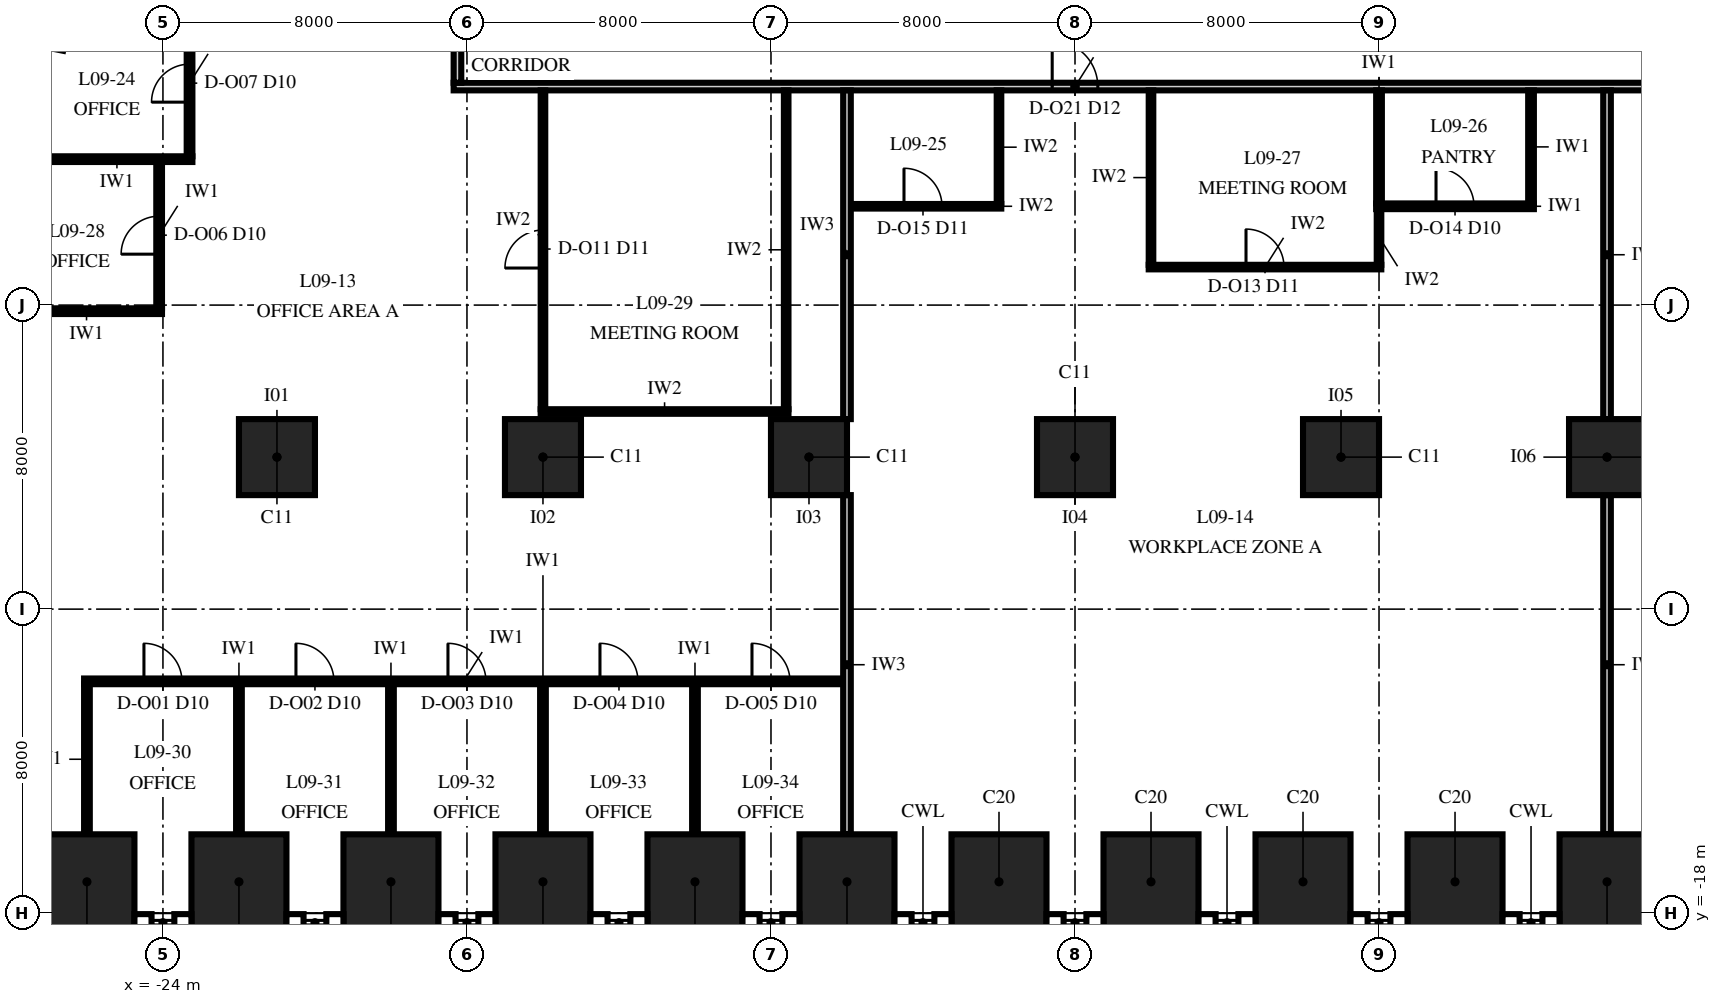
"""IFC4 building model, lengths in metres.
Left out: names, types, materials, properties, quantities, classifications, styles, units other than length and angle.
Written with IfcOpenShell. Run it as: python <this file> out.ifc"""

import sys

from ifc_helpers import new_model, si_unit, direction, frame, frame_2d, origin, origin_2d, place, context, subcontext, project, spatial, rectangle, extrude, element, fill, save


model = new_model("IFC4")
c1 = context("Model", 3, precision=1e-05, world=origin(), true_north=direction((0.0, 1.0)))
c2 = subcontext(c1, "Body", "Model", "MODEL_VIEW")
j1 = project(units=[si_unit("LENGTHUNIT", "METRE"), si_unit("PLANEANGLEUNIT", "RADIAN")], contexts=[c1])
p1 = place(None, origin())
s1 = spatial("IfcSite", under=j1, at=p1, CompositionType="ELEMENT")
p2 = place(p1, origin())
s2 = spatial("IfcBuilding", under=s1, at=p2, CompositionType="ELEMENT")
p3 = place(p2, frame((0.0, 0.0, 48.0)))
s3 = spatial("IfcBuildingStorey", under=s2, at=p3, CompositionType="ELEMENT", Elevation=48.0)
for number, where, z_axis, x_axis in (
    (1, (-26.0, -17.175, 0.0), (0.0, 0.0, 1.0), (1.0, 0.0, 0.0)),
    (2, (-22.0, -17.175, 0.0), (0.0, 0.0, 1.0), (1.0, 0.0, 0.0)),
    (3, (-18.0, -17.175, 0.0), (0.0, 0.0, 1.0), (1.0, 0.0, 0.0)),
    (4, (-14.0, -17.175, 0.0), (0.0, 0.0, 1.0), (1.0, 0.0, 0.0)),
    (5, (-10.0, -17.175, 0.0), (0.0, 0.0, 1.0), (1.0, 0.0, 0.0)),
    (6, (-6.0, -17.175, 0.0), (0.0, 0.0, 1.0), (1.0, 0.0, 0.0)),
    (7, (-2.0, -17.175, 0.0), (0.0, 0.0, 1.0), (1.0, 0.0, 0.0)),
    (8, (2.0, -17.175, 0.0), (0.0, 0.0, 1.0), (1.0, 0.0, 0.0)),
    (9, (6.0, -17.175, 0.0), (0.0, 0.0, 1.0), (1.0, 0.0, 0.0)),
    (10, (10.0, -17.175, 0.0), (0.0, 0.0, 1.0), (1.0, 0.0, 0.0)),
    (11, (14.0, -17.175, 0.0), (0.0, 0.0, 1.0), (1.0, 0.0, 0.0)),
):
    element("IfcColumn", number, at=place(p3, frame(where, z_axis=z_axis, x_axis=x_axis)), inside=s3, PredefinedType="COLUMN", context=c2, shape_type="SweptSolid", body=[
        extrude(rectangle(XDim=2.5, YDim=2.5, at=origin_2d()), origin(), (0.0, 0.0, 1.0), 4.0),
    ])
for number, where, z_axis, x_axis in (
    (12, (-21.0, -6.0, 0.0), (0.0, 0.0, 1.0), (1.0, 0.0, 0.0)),
    (13, (-14.0, -6.0, 0.0), (0.0, 0.0, 1.0), (1.0, 0.0, 0.0)),
    (14, (-7.0, -6.0, 0.0), (0.0, 0.0, 1.0), (1.0, 0.0, 0.0)),
    (15, (0.0, -6.0, 0.0), (0.0, 0.0, 1.0), (1.0, 0.0, 0.0)),
    (16, (7.0, -6.0, 0.0), (0.0, 0.0, 1.0), (1.0, 0.0, 0.0)),
    (17, (14.0, -6.0, 0.0), (0.0, 0.0, 1.0), (1.0, 0.0, 0.0)),
):
    element("IfcColumn", number, at=place(p3, frame(where, z_axis=z_axis, x_axis=x_axis)), inside=s3, PredefinedType="COLUMN", context=c2, shape_type="SweptSolid", body=[
        extrude(rectangle(XDim=2.0, YDim=2.0, at=origin_2d()), origin(), (0.0, 0.0, 1.0), 4.0),
    ])
p4 = place(p3, frame((-26.075, -11.9, 0.0), z_axis=(0.0, 0.0, 1.0), x_axis=(1.0, 0.0, 0.0)))
e18 = element("IfcWall", 18, at=p4, inside=s3, PredefinedType="PARTITIONING", context=c2, shape_type="SweptSolid", body=[
    extrude(rectangle(XDim=19.975, YDim=0.15, at=frame_2d((9.987, 0.0))), origin(), (0.0, 0.0, 1.0), 3.25),
])
p5 = place(p4, frame((1.575, 0.0, 0.0)))
e19 = element("IfcOpeningElement", 19, at=p5, cuts=e18, PredefinedType="OPENING", context=c2, shape_type="SweptSolid", body=[
    extrude(rectangle(XDim=1.0, YDim=2.3, at=frame_2d((0.5, 1.15))), frame((0.0, 0.09, 0.0), z_axis=(0.0, -1.0, 0.0), x_axis=(1.0, 0.0, 0.0)), (0.0, 0.0, 1.0), 0.18),
])
p6 = place(p4, frame((5.575, 0.0, 0.0)))
e20 = element("IfcOpeningElement", 20, at=p6, cuts=e18, PredefinedType="OPENING", context=c2, shape_type="SweptSolid", body=[
    extrude(rectangle(XDim=1.0, YDim=2.3, at=frame_2d((0.5, 1.15))), frame((0.0, 0.09, 0.0), z_axis=(0.0, -1.0, 0.0), x_axis=(1.0, 0.0, 0.0)), (0.0, 0.0, 1.0), 0.18),
])
p7 = place(p4, frame((9.575, 0.0, 0.0)))
e21 = element("IfcOpeningElement", 21, at=p7, cuts=e18, PredefinedType="OPENING", context=c2, shape_type="SweptSolid", body=[
    extrude(rectangle(XDim=1.0, YDim=2.3, at=frame_2d((0.5, 1.15))), frame((0.0, 0.09, 0.0), z_axis=(0.0, -1.0, 0.0), x_axis=(1.0, 0.0, 0.0)), (0.0, 0.0, 1.0), 0.18),
])
p8 = place(p4, frame((13.575, 0.0, 0.0)))
e22 = element("IfcOpeningElement", 22, at=p8, cuts=e18, PredefinedType="OPENING", context=c2, shape_type="SweptSolid", body=[
    extrude(rectangle(XDim=1.0, YDim=2.3, at=frame_2d((0.5, 1.15))), frame((0.0, 0.09, 0.0), z_axis=(0.0, -1.0, 0.0), x_axis=(1.0, 0.0, 0.0)), (0.0, 0.0, 1.0), 0.18),
])
p9 = place(p4, frame((17.575, 0.0, 0.0)))
e23 = element("IfcOpeningElement", 23, at=p9, cuts=e18, PredefinedType="OPENING", context=c2, shape_type="SweptSolid", body=[
    extrude(rectangle(XDim=1.0, YDim=2.3, at=frame_2d((0.5, 1.15))), frame((0.0, 0.09, 0.0), z_axis=(0.0, -1.0, 0.0), x_axis=(1.0, 0.0, 0.0)), (0.0, 0.0, 1.0), 0.18),
])
p10 = place(p3, frame((-14.06, -4.8, 0.0), z_axis=(0.0, 0.0, 1.0), x_axis=(1.0, 0.0, 0.0)))
e24 = element("IfcWall", 24, at=p10, inside=s3, PredefinedType="PARTITIONING", context=c2, shape_type="SweptSolid", body=[
    extrude(rectangle(XDim=6.52, YDim=0.12, at=frame_2d((3.26, 0.0))), origin(), (0.0, 0.0, 1.0), 3.25),
])
p11 = place(p3, frame((-27.996, -2.16, 0.0), z_axis=(0.0, 0.0, 1.0), x_axis=(1.0, 0.0, 0.0)))
e25 = element("IfcWall", 25, at=p11, inside=s3, PredefinedType="PARTITIONING", context=c2, shape_type="SweptSolid", body=[
    extrude(rectangle(XDim=3.971, YDim=0.15, at=frame_2d((1.986, 0.0))), origin(), (0.0, 0.0, 1.0), 3.25),
])
p12 = place(p3, frame((1.94, -1.0, 0.0), z_axis=(0.0, 0.0, 1.0), x_axis=(1.0, 0.0, 0.0)))
e26 = element("IfcWall", 26, at=p12, inside=s3, PredefinedType="PARTITIONING", context=c2, shape_type="SweptSolid", body=[
    extrude(rectangle(XDim=6.12, YDim=0.12, at=frame_2d((3.06, 0.0))), origin(), (0.0, 0.0, 1.0), 3.25),
])
p13 = place(p12, frame((2.56, 0.0, 0.0)))
e27 = element("IfcOpeningElement", 27, at=p13, cuts=e26, PredefinedType="OPENING", context=c2, shape_type="SweptSolid", body=[
    extrude(rectangle(XDim=1.0, YDim=2.4, at=frame_2d((0.5, 1.2))), frame((0.0, 0.075, 0.0), z_axis=(0.0, -1.0, 0.0), x_axis=(1.0, 0.0, 0.0)), (0.0, 0.0, 1.0), 0.15),
])
p14 = place(p3, frame((-5.9, 0.6, 0.0), z_axis=(0.0, 0.0, 1.0), x_axis=(1.0, 0.0, 0.0)))
e28 = element("IfcWall", 28, at=p14, inside=s3, PredefinedType="PARTITIONING", context=c2, shape_type="SweptSolid", body=[
    extrude(rectangle(XDim=3.96, YDim=0.12, at=frame_2d((1.98, 0.0))), origin(), (0.0, 0.0, 1.0), 3.25),
])
p15 = place(p14, frame((1.4, 0.0, 0.0)))
e29 = element("IfcOpeningElement", 29, at=p15, cuts=e28, PredefinedType="OPENING", context=c2, shape_type="SweptSolid", body=[
    extrude(rectangle(XDim=1.0, YDim=2.4, at=frame_2d((0.5, 1.2))), frame((0.0, 0.075, 0.0), z_axis=(0.0, -1.0, 0.0), x_axis=(1.0, 0.0, 0.0)), (0.0, 0.0, 1.0), 0.15),
])
p16 = place(p3, frame((7.925, 0.6, 0.0), z_axis=(0.0, 0.0, 1.0), x_axis=(1.0, 0.0, 0.0)))
e30 = element("IfcWall", 30, at=p16, inside=s3, PredefinedType="PARTITIONING", context=c2, shape_type="SweptSolid", body=[
    extrude(rectangle(XDim=4.15, YDim=0.15, at=frame_2d((2.075, 0.0))), origin(), (0.0, 0.0, 1.0), 3.25),
])
p17 = place(p16, frame((1.575, 0.0, 0.0)))
e31 = element("IfcOpeningElement", 31, at=p17, cuts=e30, PredefinedType="OPENING", context=c2, shape_type="SweptSolid", body=[
    extrude(rectangle(XDim=1.0, YDim=2.3, at=frame_2d((0.5, 1.15))), frame((0.0, 0.09, 0.0), z_axis=(0.0, -1.0, 0.0), x_axis=(1.0, 0.0, 0.0)), (0.0, 0.0, 1.0), 0.18),
])
p18 = place(p3, frame((-27.196, 1.84, 0.0), z_axis=(0.0, 0.0, 1.0), x_axis=(1.0, 0.0, 0.0)))
e32 = element("IfcWall", 32, at=p18, inside=s3, PredefinedType="PARTITIONING", context=c2, shape_type="SweptSolid", body=[
    extrude(rectangle(XDim=3.971, YDim=0.15, at=frame_2d((1.986, 0.0))), origin(), (0.0, 0.0, 1.0), 3.25),
])
p19 = place(p3, frame((-16.35, 3.75, 0.0), z_axis=(0.0, 0.0, 1.0), x_axis=(1.0, 0.0, 0.0)))
e33 = element("IfcWall", 33, at=p19, inside=s3, PredefinedType="PARTITIONING", context=c2, shape_type="SweptSolid", body=[
    extrude(rectangle(XDim=32.7, YDim=0.2, at=frame_2d((16.35, 0.0))), origin(), (0.0, 0.0, 1.0), 3.25),
])
p20 = place(p19, frame((15.75, 0.0, 0.0)))
e34 = element("IfcOpeningElement", 34, at=p20, cuts=e33, PredefinedType="OPENING", context=c2, shape_type="SweptSolid", body=[
    extrude(rectangle(XDim=1.2, YDim=2.4, at=frame_2d((0.6, 1.2))), frame((0.0, 0.115, 0.0), z_axis=(0.0, -1.0, 0.0), x_axis=(1.0, 0.0, 0.0)), (0.0, 0.0, 1.0), 0.23),
])
p21 = place(p3, frame((-26.0, -15.925, 0.0), z_axis=(0.0, 0.0, 1.0), x_axis=(0.0, 1.0, 0.0)))
e35 = element("IfcWall", 35, at=p21, inside=s3, PredefinedType="PARTITIONING", context=c2, shape_type="SweptSolid", body=[
    extrude(rectangle(XDim=3.95, YDim=0.15, at=frame_2d((1.975, 0.0))), origin(), (0.0, 0.0, 1.0), 3.25),
])
p22 = place(p3, frame((-24.1, -2.085, 0.0), z_axis=(0.0, 0.0, 1.0), x_axis=(0.0, 1.0, 0.0)))
e36 = element("IfcWall", 36, at=p22, inside=s3, PredefinedType="PARTITIONING", context=c2, shape_type="SweptSolid", body=[
    extrude(rectangle(XDim=3.85, YDim=0.15, at=frame_2d((1.925, 0.0))), origin(), (0.0, 0.0, 1.0), 3.85),
])
p23 = place(p22, frame((1.425, 0.0, 0.0)))
e37 = element("IfcOpeningElement", 37, at=p23, cuts=e36, PredefinedType="OPENING", context=c2, shape_type="SweptSolid", body=[
    extrude(rectangle(XDim=1.0, YDim=2.3, at=frame_2d((0.5, 1.15))), frame((0.0, 0.09, 0.0), z_axis=(0.0, -1.0, 0.0), x_axis=(1.0, 0.0, 0.0)), (0.0, 0.0, 1.0), 0.18),
])
p24 = place(p3, frame((-23.3, 1.915, 0.0), z_axis=(0.0, 0.0, 1.0), x_axis=(0.0, 1.0, 0.0)))
e38 = element("IfcWall", 38, at=p24, inside=s3, PredefinedType="PARTITIONING", context=c2, shape_type="SweptSolid", body=[
    extrude(rectangle(XDim=3.85, YDim=0.15, at=frame_2d((1.925, 0.0))), origin(), (0.0, 0.0, 1.0), 3.85),
])
p25 = place(p24, frame((1.425, 0.0, 0.0)))
e39 = element("IfcOpeningElement", 39, at=p25, cuts=e38, PredefinedType="OPENING", context=c2, shape_type="SweptSolid", body=[
    extrude(rectangle(XDim=1.0, YDim=2.3, at=frame_2d((0.5, 1.15))), frame((0.0, 0.09, 0.0), z_axis=(0.0, -1.0, 0.0), x_axis=(1.0, 0.0, 0.0)), (0.0, 0.0, 1.0), 0.18),
])
for number, where, z_axis, x_axis in (
    (40, (-22.0, -15.925, 0.0), (0.0, 0.0, 1.0), (0.0, 1.0, 0.0)),
    (41, (-18.0, -15.925, 0.0), (0.0, 0.0, 1.0), (0.0, 1.0, 0.0)),
):
    element("IfcWall", number, at=place(p3, frame(where, z_axis=z_axis, x_axis=x_axis)), inside=s3, PredefinedType="PARTITIONING", context=c2, shape_type="SweptSolid", body=[
        extrude(rectangle(XDim=3.95, YDim=0.15, at=frame_2d((1.975, 0.0))), origin(), (0.0, 0.0, 1.0), 3.25),
    ])
p26 = place(p3, frame((-16.25, 3.85, 0.0), z_axis=(0.0, 0.0, 1.0), x_axis=(0.0, 1.0, 0.0)))
e42 = element("IfcWall", 42, at=p26, inside=s3, PredefinedType="PARTITIONING", context=c2, shape_type="SweptSolid", body=[
    extrude(rectangle(XDim=22.3, YDim=0.2, at=frame_2d((11.15, 0.0))), origin(), (0.0, 0.0, 1.0), 2.842),
])
p27 = place(p26, frame((4.55, 0.0, 0.0)))
e43 = element("IfcOpeningElement", 43, at=p27, cuts=e42, PredefinedType="OPENING", context=c2, shape_type="SweptSolid", body=[
    extrude(rectangle(XDim=1.2, YDim=2.4, at=frame_2d((0.6, 1.2))), frame((0.0, 0.115, 0.0), z_axis=(0.0, -1.0, 0.0), x_axis=(1.0, 0.0, 0.0)), (0.0, 0.0, 1.0), 0.23),
])
p28 = place(p3, frame((-14.0, -15.925, 0.0), z_axis=(0.0, 0.0, 1.0), x_axis=(0.0, 1.0, 0.0)))
e44 = element("IfcWall", 44, at=p28, inside=s3, PredefinedType="PARTITIONING", context=c2, shape_type="SweptSolid", body=[
    extrude(rectangle(XDim=3.95, YDim=0.15, at=frame_2d((1.975, 0.0))), origin(), (0.0, 0.0, 1.0), 3.25),
])
p29 = place(p3, frame((-14.0, -4.74, 0.0), z_axis=(0.0, 0.0, 1.0), x_axis=(0.0, 1.0, 0.0)))
e45 = element("IfcWall", 45, at=p29, inside=s3, PredefinedType="PARTITIONING", context=c2, shape_type="SweptSolid", body=[
    extrude(rectangle(XDim=8.39, YDim=0.12, at=frame_2d((4.195, 0.0))), origin(), (0.0, 0.0, 1.0), 3.25),
])
p30 = place(p29, frame((3.715, 0.0, 0.0)))
e46 = element("IfcOpeningElement", 46, at=p30, cuts=e45, PredefinedType="OPENING", context=c2, shape_type="SweptSolid", body=[
    extrude(rectangle(XDim=1.0, YDim=2.4, at=frame_2d((0.5, 1.2))), frame((0.0, 0.075, 0.0), z_axis=(0.0, -1.0, 0.0), x_axis=(1.0, 0.0, 0.0)), (0.0, 0.0, 1.0), 0.15),
])
p31 = place(p3, frame((-10.0, -15.925, 0.0), z_axis=(0.0, 0.0, 1.0), x_axis=(0.0, 1.0, 0.0)))
e47 = element("IfcWall", 47, at=p31, inside=s3, PredefinedType="PARTITIONING", context=c2, shape_type="SweptSolid", body=[
    extrude(rectangle(XDim=3.95, YDim=0.15, at=frame_2d((1.975, 0.0))), origin(), (0.0, 0.0, 1.0), 3.25),
])
p32 = place(p3, frame((-7.6, -4.74, 0.0), z_axis=(0.0, 0.0, 1.0), x_axis=(0.0, 1.0, 0.0)))
e48 = element("IfcWall", 48, at=p32, inside=s3, PredefinedType="PARTITIONING", context=c2, shape_type="SweptSolid", body=[
    extrude(rectangle(XDim=8.39, YDim=0.12, at=frame_2d((4.195, 0.0))), origin(), (0.0, 0.0, 1.0), 3.85),
])
p33 = place(p3, frame((-6.0, -15.925, 0.0), z_axis=(0.0, 0.0, 1.0), x_axis=(0.0, 1.0, 0.0)))
e49 = element("IfcWall", 49, at=p33, inside=s3, PredefinedType="PARTITIONING", context=c2, shape_type="SweptSolid", body=[
    extrude(rectangle(XDim=8.925, YDim=0.2, at=frame_2d((4.462, 0.0))), origin(), (0.0, 0.0, 1.0), 3.25),
])
p34 = place(p3, frame((-6.0, -5.0, 0.0), z_axis=(0.0, 0.0, 1.0), x_axis=(0.0, 1.0, 0.0)))
e50 = element("IfcWall", 50, at=p34, inside=s3, PredefinedType="PARTITIONING", context=c2, shape_type="SweptSolid", body=[
    extrude(rectangle(XDim=8.65, YDim=0.2, at=frame_2d((4.325, 0.0))), origin(), (0.0, 0.0, 1.0), 3.25),
])
p35 = place(p3, frame((-2.0, 0.66, 0.0), z_axis=(0.0, 0.0, 1.0), x_axis=(0.0, 1.0, 0.0)))
e51 = element("IfcWall", 51, at=p35, inside=s3, PredefinedType="PARTITIONING", context=c2, shape_type="SweptSolid", body=[
    extrude(rectangle(XDim=2.99, YDim=0.12, at=frame_2d((1.495, 0.0))), origin(), (0.0, 0.0, 1.0), 3.85),
])
p36 = place(p3, frame((2.0, -0.94, 0.0), z_axis=(0.0, 0.0, 1.0), x_axis=(0.0, 1.0, 0.0)))
e52 = element("IfcWall", 52, at=p36, inside=s3, PredefinedType="PARTITIONING", context=c2, shape_type="SweptSolid", body=[
    extrude(rectangle(XDim=4.59, YDim=0.12, at=frame_2d((2.295, 0.0))), origin(), (0.0, 0.0, 1.0), 3.85),
])
p37 = place(p3, frame((8.0, -0.94, 0.0), z_axis=(0.0, 0.0, 1.0), x_axis=(0.0, 1.0, 0.0)))
e53 = element("IfcWall", 53, at=p37, inside=s3, PredefinedType="PARTITIONING", context=c2, shape_type="SweptSolid", body=[
    extrude(rectangle(XDim=1.465, YDim=0.12, at=frame_2d((0.732, 0.0))), origin(), (0.0, 0.0, 1.0), 3.85),
])
for number, where, z_axis, x_axis in (
    (54, (8.0, 0.675, 0.0), (0.0, 0.0, 1.0), (0.0, 1.0, 0.0)),
    (55, (12.0, 0.675, 0.0), (0.0, 0.0, 1.0), (0.0, 1.0, 0.0)),
):
    element("IfcWall", number, at=place(p3, frame(where, z_axis=z_axis, x_axis=x_axis)), inside=s3, PredefinedType="PARTITIONING", context=c2, shape_type="SweptSolid", body=[
        extrude(rectangle(XDim=2.975, YDim=0.15, at=frame_2d((1.487, 0.0))), origin(), (0.0, 0.0, 1.0), 3.85),
    ])
p38 = place(p3, frame((14.0, -15.925, 0.0), z_axis=(0.0, 0.0, 1.0), x_axis=(0.0, 1.0, 0.0)))
e56 = element("IfcWall", 56, at=p38, inside=s3, PredefinedType="PARTITIONING", context=c2, shape_type="SweptSolid", body=[
    extrude(rectangle(XDim=8.925, YDim=0.2, at=frame_2d((4.462, 0.0))), origin(), (0.0, 0.0, 1.0), 3.25),
])
p39 = place(p3, frame((14.0, -5.0, 0.0), z_axis=(0.0, 0.0, 1.0), x_axis=(0.0, 1.0, 0.0)))
e57 = element("IfcWall", 57, at=p39, inside=s3, PredefinedType="PARTITIONING", context=c2, shape_type="SweptSolid", body=[
    extrude(rectangle(XDim=8.65, YDim=0.2, at=frame_2d((4.325, 0.0))), origin(), (0.0, 0.0, 1.0), 3.25),
])
p40 = place(p5, origin())
e58 = element("IfcDoor", 58, at=p40, inside=s3, OperationType="SINGLE_SWING_LEFT", PredefinedType="DOOR", context=c2, shape_type="SweptSolid", body=[
    extrude(rectangle(XDim=1.0, YDim=2.3, at=frame_2d((0.5, 1.15))), frame((0.0, 0.075, 0.0), z_axis=(0.0, -1.0, 0.0), x_axis=(1.0, 0.0, 0.0)), (0.0, 0.0, 1.0), 0.149),
])
fill(e19, e58)
p41 = place(p6, origin())
e59 = element("IfcDoor", 59, at=p41, inside=s3, OperationType="SINGLE_SWING_LEFT", PredefinedType="DOOR", context=c2, shape_type="SweptSolid", body=[
    extrude(rectangle(XDim=1.0, YDim=2.3, at=frame_2d((0.5, 1.15))), frame((0.0, 0.075, 0.0), z_axis=(0.0, -1.0, 0.0), x_axis=(1.0, 0.0, 0.0)), (0.0, 0.0, 1.0), 0.149),
])
fill(e20, e59)
p42 = place(p7, origin())
e60 = element("IfcDoor", 60, at=p42, inside=s3, OperationType="SINGLE_SWING_LEFT", PredefinedType="DOOR", context=c2, shape_type="SweptSolid", body=[
    extrude(rectangle(XDim=1.0, YDim=2.3, at=frame_2d((0.5, 1.15))), frame((0.0, 0.075, 0.0), z_axis=(0.0, -1.0, 0.0), x_axis=(1.0, 0.0, 0.0)), (0.0, 0.0, 1.0), 0.149),
])
fill(e21, e60)
p43 = place(p8, origin())
e61 = element("IfcDoor", 61, at=p43, inside=s3, OperationType="SINGLE_SWING_LEFT", PredefinedType="DOOR", context=c2, shape_type="SweptSolid", body=[
    extrude(rectangle(XDim=1.0, YDim=2.3, at=frame_2d((0.5, 1.15))), frame((0.0, 0.075, 0.0), z_axis=(0.0, -1.0, 0.0), x_axis=(1.0, 0.0, 0.0)), (0.0, 0.0, 1.0), 0.149),
])
fill(e22, e61)
p44 = place(p9, origin())
e62 = element("IfcDoor", 62, at=p44, inside=s3, OperationType="SINGLE_SWING_LEFT", PredefinedType="DOOR", context=c2, shape_type="SweptSolid", body=[
    extrude(rectangle(XDim=1.0, YDim=2.3, at=frame_2d((0.5, 1.15))), frame((0.0, 0.075, 0.0), z_axis=(0.0, -1.0, 0.0), x_axis=(1.0, 0.0, 0.0)), (0.0, 0.0, 1.0), 0.149),
])
fill(e23, e62)
p45 = place(p23, origin())
e63 = element("IfcDoor", 63, at=p45, inside=s3, OperationType="SINGLE_SWING_LEFT", PredefinedType="DOOR", context=c2, shape_type="SweptSolid", body=[
    extrude(rectangle(XDim=1.0, YDim=2.3, at=frame_2d((0.5, 1.15))), frame((0.0, 0.075, 0.0), z_axis=(0.0, -1.0, 0.0), x_axis=(1.0, 0.0, 0.0)), (0.0, 0.0, 1.0), 0.149),
])
fill(e37, e63)
p46 = place(p25, origin())
e64 = element("IfcDoor", 64, at=p46, inside=s3, OperationType="SINGLE_SWING_LEFT", PredefinedType="DOOR", context=c2, shape_type="SweptSolid", body=[
    extrude(rectangle(XDim=1.0, YDim=2.3, at=frame_2d((0.5, 1.15))), frame((0.0, 0.075, 0.0), z_axis=(0.0, -1.0, 0.0), x_axis=(1.0, 0.0, 0.0)), (0.0, 0.0, 1.0), 0.149),
])
fill(e39, e64)
p47 = place(p30, origin())
e65 = element("IfcDoor", 65, at=p47, inside=s3, OperationType="SINGLE_SWING_RIGHT", PredefinedType="DOOR", context=c2, shape_type="SweptSolid", body=[
    extrude(rectangle(XDim=1.0, YDim=2.4, at=frame_2d((0.5, 1.2))), frame((0.0, 0.06, 0.0), z_axis=(0.0, -1.0, 0.0), x_axis=(1.0, 0.0, 0.0)), (0.0, 0.0, 1.0), 0.12),
])
fill(e46, e65)
p48 = place(p13, origin())
e66 = element("IfcDoor", 66, at=p48, inside=s3, OperationType="SINGLE_SWING_RIGHT", PredefinedType="DOOR", context=c2, shape_type="SweptSolid", body=[
    extrude(rectangle(XDim=1.0, YDim=2.4, at=frame_2d((0.5, 1.2))), frame((0.0, 0.06, 0.0), z_axis=(0.0, -1.0, 0.0), x_axis=(1.0, 0.0, 0.0)), (0.0, 0.0, 1.0), 0.12),
])
fill(e27, e66)
p49 = place(p17, origin())
e67 = element("IfcDoor", 67, at=p49, inside=s3, OperationType="SINGLE_SWING_LEFT", PredefinedType="DOOR", context=c2, shape_type="SweptSolid", body=[
    extrude(rectangle(XDim=1.0, YDim=2.3, at=frame_2d((0.5, 1.15))), frame((0.0, 0.075, 0.0), z_axis=(0.0, -1.0, 0.0), x_axis=(1.0, 0.0, 0.0)), (0.0, 0.0, 1.0), 0.149),
])
fill(e31, e67)
p50 = place(p15, origin())
e68 = element("IfcDoor", 68, at=p50, inside=s3, OperationType="SINGLE_SWING_RIGHT", PredefinedType="DOOR", context=c2, shape_type="SweptSolid", body=[
    extrude(rectangle(XDim=1.0, YDim=2.4, at=frame_2d((0.5, 1.2))), frame((0.0, 0.06, 0.0), z_axis=(0.0, -1.0, 0.0), x_axis=(1.0, 0.0, 0.0)), (0.0, 0.0, 1.0), 0.12),
])
fill(e29, e68)
p51 = place(p20, origin())
e69 = element("IfcDoor", 69, at=p51, inside=s3, OperationType="SINGLE_SWING_LEFT", PredefinedType="DOOR", context=c2, shape_type="SweptSolid", body=[
    extrude(rectangle(XDim=1.2, YDim=2.4, at=frame_2d((0.6, 1.2))), frame((0.0, 0.1, 0.0), z_axis=(0.0, -1.0, 0.0), x_axis=(1.0, 0.0, 0.0)), (0.0, 0.0, 1.0), 0.199),
])
fill(e34, e69)
save(model, sys.argv[1])
